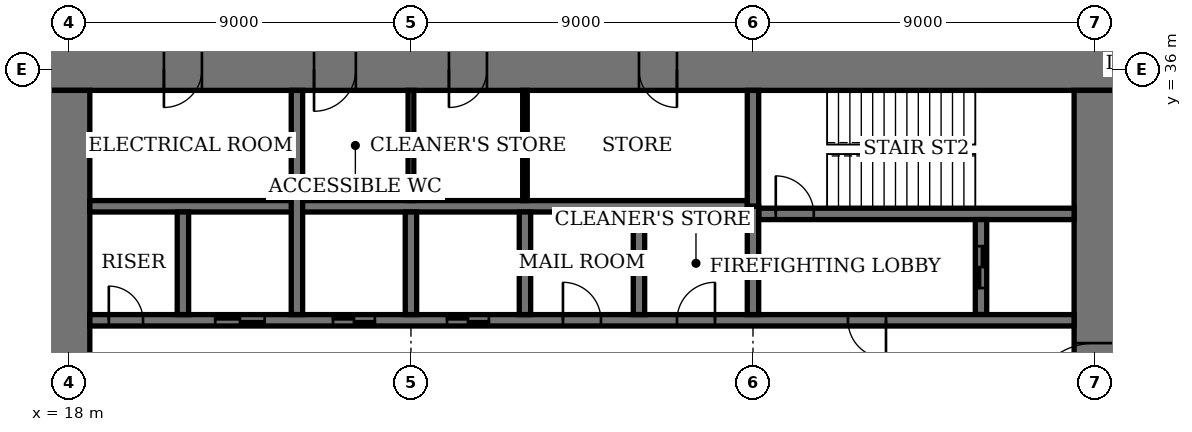
"""IFC4 building model, lengths in metres.
Left out: names, types, materials, properties, quantities, classifications, styles, units other than length and angle.
Written with IfcOpenShell. Run it as: python <this file> out.ifc"""

import sys

from ifc_helpers import new_model, si_unit, direction, frame, frame_2d, origin, place, context, subcontext, project, spatial, rectangle, extrude, element, fill, save


model = new_model("IFC4")
c1 = context("Model", 3, precision=1e-05, world=origin(), true_north=direction((0.0, 1.0)))
c2 = subcontext(c1, "Body", "Model", "MODEL_VIEW")
j1 = project(units=[si_unit("LENGTHUNIT", "METRE"), si_unit("PLANEANGLEUNIT", "RADIAN")], contexts=[c1])
p1 = place(None, origin())
s1 = spatial("IfcSite", under=j1, at=p1, CompositionType="ELEMENT")
p2 = place(p1, origin())
s2 = spatial("IfcBuilding", under=s1, at=p2, CompositionType="ELEMENT")
p3 = place(p2, frame((0.0, 0.0, 194.2)))
s3 = spatial("IfcBuildingStorey", under=s2, at=p3, CompositionType="ELEMENT", Elevation=194.2)
p4 = place(p3, frame((45.55, 36.0, 0.0), z_axis=(0.0, 0.0, 1.0), x_axis=(-1.0, 0.0, 0.0)))
e1 = element("IfcWall", 1, at=p4, inside=s3, PredefinedType="SHEAR", context=c2, shape_type="SweptSolid", body=[
    extrude(rectangle(XDim=28.1, YDim=1.1, at=frame_2d((14.05, 0.0))), origin(), (0.0, 0.0, 1.0), 4.0),
])
p5 = place(p4, frame((11.55, 0.0, 0.0)))
e2 = element("IfcOpeningElement", 2, at=p5, cuts=e1, PredefinedType="OPENING", context=c2, shape_type="SweptSolid", body=[
    extrude(rectangle(XDim=1.0, YDim=2.4, at=frame_2d((0.5, 1.2))), frame((0.0, 0.56, 0.0), z_axis=(0.0, -1.0, 0.0), x_axis=(1.0, 0.0, 0.0)), (0.0, 0.0, 1.0), 1.12),
])
p6 = place(p4, frame((16.55, 0.0, 0.0)))
e3 = element("IfcOpeningElement", 3, at=p6, cuts=e1, PredefinedType="OPENING", context=c2, shape_type="SweptSolid", body=[
    extrude(rectangle(XDim=1.0, YDim=2.4, at=frame_2d((0.5, 1.2))), frame((0.0, 0.56, 0.0), z_axis=(0.0, -1.0, 0.0), x_axis=(1.0, 0.0, 0.0)), (0.0, 0.0, 1.0), 1.12),
])
p7 = place(p4, frame((20.0, 0.0, 0.0)))
e4 = element("IfcOpeningElement", 4, at=p7, cuts=e1, PredefinedType="OPENING", context=c2, shape_type="SweptSolid", body=[
    extrude(rectangle(XDim=1.1, YDim=2.4, at=frame_2d((0.55, 1.2))), frame((0.0, 0.56, 0.0), z_axis=(0.0, -1.0, 0.0), x_axis=(1.0, 0.0, 0.0)), (0.0, 0.0, 1.0), 1.12),
])
p8 = place(p4, frame((24.05, 0.0, 0.0)))
e5 = element("IfcOpeningElement", 5, at=p8, cuts=e1, PredefinedType="OPENING", context=c2, shape_type="SweptSolid", body=[
    extrude(rectangle(XDim=1.0, YDim=2.4, at=frame_2d((0.5, 1.2))), frame((0.0, 0.56, 0.0), z_axis=(0.0, -1.0, 0.0), x_axis=(1.0, 0.0, 0.0)), (0.0, 0.0, 1.0), 1.12),
])
p9 = place(p3, frame((18.0, 35.45, 0.0), z_axis=(0.0, 0.0, 1.0), x_axis=(0.0, -1.0, 0.0)))
e6 = element("IfcWall", 6, at=p9, inside=s3, PredefinedType="SHEAR", context=c2, shape_type="SweptSolid", body=[
    extrude(rectangle(XDim=16.9, YDim=1.1, at=frame_2d((8.45, 0.0))), origin(), (0.0, 0.0, 1.0), 4.0),
])
p10 = place(p9, frame((8.45, 0.0, 0.0)))
e7 = element("IfcOpeningElement", 7, at=p10, cuts=e6, PredefinedType="OPENING", context=c2, shape_type="SweptSolid", body=[
    extrude(rectangle(XDim=1.8, YDim=2.4, at=frame_2d((0.9, 1.2))), frame((0.0, 0.56, 0.0), z_axis=(0.0, -1.0, 0.0), x_axis=(1.0, 0.0, 0.0)), (0.0, 0.0, 1.0), 1.12),
])
p11 = place(p3, frame((45.0, 18.55, 0.0), z_axis=(0.0, 0.0, 1.0), x_axis=(0.0, 1.0, 0.0)))
e8 = element("IfcWall", 8, at=p11, inside=s3, PredefinedType="SHEAR", context=c2, shape_type="SweptSolid", body=[
    extrude(rectangle(XDim=16.9, YDim=1.1, at=frame_2d((8.45, 0.0))), origin(), (0.0, 0.0, 1.0), 4.0),
])
p12 = place(p11, frame((8.45, 0.0, 0.0)))
e9 = element("IfcOpeningElement", 9, at=p12, cuts=e8, PredefinedType="OPENING", context=c2, shape_type="SweptSolid", body=[
    extrude(rectangle(XDim=1.8, YDim=2.4, at=frame_2d((0.9, 1.2))), frame((0.0, 0.56, 0.0), z_axis=(0.0, -1.0, 0.0), x_axis=(1.0, 0.0, 0.0)), (0.0, 0.0, 1.0), 1.12),
])
p13 = place(p3, frame((36.15, 32.2, 0.0), z_axis=(0.0, 0.0, 1.0), x_axis=(1.0, 0.0, 0.0)))
e10 = element("IfcWall", 10, at=p13, inside=s3, PredefinedType="SHEAR", context=c2, shape_type="SweptSolid", body=[
    extrude(rectangle(XDim=8.3, YDim=0.3, at=frame_2d((4.15, 0.0))), origin(), (0.0, 0.0, 1.0), 4.0),
])
p14 = place(p13, frame((0.45, 0.0, 0.0)))
e11 = element("IfcOpeningElement", 11, at=p14, cuts=e10, PredefinedType="OPENING", context=c2, shape_type="SweptSolid", body=[
    extrude(rectangle(XDim=1.0, YDim=2.4, at=frame_2d((0.5, 1.2))), frame((0.0, 0.16, 0.0), z_axis=(0.0, -1.0, 0.0), x_axis=(1.0, 0.0, 0.0)), (0.0, 0.0, 1.0), 0.32),
])
p15 = place(p3, frame((36.0, 32.4, 0.0), z_axis=(0.0, 0.0, 1.0), x_axis=(0.0, 1.0, 0.0)))
e12 = element("IfcWall", 12, at=p15, inside=s3, PredefinedType="SHEAR", context=c2, shape_type="SweptSolid", body=[
    extrude(rectangle(XDim=3.05, YDim=0.3, at=frame_2d((1.525, 0.0))), origin(), (0.0, 0.0, 1.0), 4.0),
])
p16 = place(p3, frame((42.0, 29.55, 0.0), z_axis=(0.0, 0.0, 1.0), x_axis=(0.0, 1.0, 0.0)))
e13 = element("IfcWall", 13, at=p16, inside=s3, PredefinedType="SHEAR", context=c2, shape_type="SweptSolid", body=[
    extrude(rectangle(XDim=2.5, YDim=0.3, at=frame_2d((1.25, 0.0))), origin(), (0.0, 0.0, 1.0), 4.0),
])
p17 = place(p16, frame((0.7, 0.0, 0.0)))
e14 = element("IfcOpeningElement", 14, at=p17, cuts=e13, PredefinedType="OPENING", context=c2, shape_type="SweptSolid", body=[
    extrude(rectangle(XDim=1.1, YDim=2.4, at=frame_2d((0.55, 1.2))), frame((0.0, 0.16, 0.0), z_axis=(0.0, -1.0, 0.0), x_axis=(1.0, 0.0, 0.0)), (0.0, 0.0, 1.0), 0.32),
])
p18 = place(p3, frame((18.55, 29.4, 0.0), z_axis=(0.0, 0.0, 1.0), x_axis=(1.0, 0.0, 0.0)))
e15 = element("IfcWall", 15, at=p18, inside=s3, PredefinedType="SHEAR", context=c2, shape_type="SweptSolid", body=[
    extrude(rectangle(XDim=25.9, YDim=0.3, at=frame_2d((12.95, 0.0))), origin(), (0.0, 0.0, 1.0), 4.0),
])
p19 = place(p18, frame((19.95, 0.0, 0.0)))
e16 = element("IfcOpeningElement", 16, at=p19, cuts=e15, PredefinedType="OPENING", context=c2, shape_type="SweptSolid", body=[
    extrude(rectangle(XDim=1.0, YDim=2.4, at=frame_2d((0.5, 1.2))), frame((0.0, 0.16, 0.0), z_axis=(0.0, -1.0, 0.0), x_axis=(1.0, 0.0, 0.0)), (0.0, 0.0, 1.0), 0.32),
])
p20 = place(p18, frame((0.5, 0.0, 0.0)))
e17 = element("IfcOpeningElement", 17, at=p20, cuts=e15, PredefinedType="OPENING", context=c2, shape_type="SweptSolid", body=[
    extrude(rectangle(XDim=0.9, YDim=2.1, at=frame_2d((0.45, 1.05))), frame((0.0, 0.16, 0.0), z_axis=(0.0, -1.0, 0.0), x_axis=(1.0, 0.0, 0.0)), (0.0, 0.0, 1.0), 0.32),
])
p21 = place(p18, frame((15.45, 0.0, 0.0)))
e18 = element("IfcOpeningElement", 18, at=p21, cuts=e15, PredefinedType="OPENING", context=c2, shape_type="SweptSolid", body=[
    extrude(rectangle(XDim=1.0, YDim=2.4, at=frame_2d((0.5, 1.2))), frame((0.0, 0.16, 0.0), z_axis=(0.0, -1.0, 0.0), x_axis=(1.0, 0.0, 0.0)), (0.0, 0.0, 1.0), 0.32),
])
p22 = place(p18, frame((12.45, 0.0, 0.0)))
e19 = element("IfcOpeningElement", 19, at=p22, cuts=e15, PredefinedType="OPENING", context=c2, shape_type="SweptSolid", body=[
    extrude(rectangle(XDim=1.0, YDim=2.4, at=frame_2d((0.5, 1.2))), frame((0.0, 0.16, 0.0), z_axis=(0.0, -1.0, 0.0), x_axis=(1.0, 0.0, 0.0)), (0.0, 0.0, 1.0), 0.32),
])
p23 = place(p18, frame((9.4, 0.0, 0.0)))
e20 = element("IfcOpeningElement", 20, at=p23, cuts=e15, PredefinedType="OPENING", context=c2, shape_type="SweptSolid", body=[
    extrude(rectangle(XDim=1.1, YDim=2.4, at=frame_2d((0.55, 1.2))), frame((0.0, 0.16, 0.0), z_axis=(0.0, -1.0, 0.0), x_axis=(1.0, 0.0, 0.0)), (0.0, 0.0, 1.0), 0.32),
])
p24 = place(p18, frame((6.4, 0.0, 0.0)))
e21 = element("IfcOpeningElement", 21, at=p24, cuts=e15, PredefinedType="OPENING", context=c2, shape_type="SweptSolid", body=[
    extrude(rectangle(XDim=1.1, YDim=2.4, at=frame_2d((0.55, 1.2))), frame((0.0, 0.16, 0.0), z_axis=(0.0, -1.0, 0.0), x_axis=(1.0, 0.0, 0.0)), (0.0, 0.0, 1.0), 0.32),
])
p25 = place(p18, frame((3.3, 0.0, 0.0)))
e22 = element("IfcOpeningElement", 22, at=p25, cuts=e15, PredefinedType="OPENING", context=c2, shape_type="SweptSolid", body=[
    extrude(rectangle(XDim=1.3, YDim=2.4, at=frame_2d((0.65, 1.2))), frame((0.0, 0.16, 0.0), z_axis=(0.0, -1.0, 0.0), x_axis=(1.0, 0.0, 0.0)), (0.0, 0.0, 1.0), 0.32),
])
p26 = place(p3, frame((18.55, 32.4, 0.0), z_axis=(0.0, 0.0, 1.0), x_axis=(1.0, 0.0, 0.0)))
e23 = element("IfcWall", 23, at=p26, inside=s3, PredefinedType="SHEAR", context=c2, shape_type="SweptSolid", body=[
    extrude(rectangle(XDim=17.3, YDim=0.3, at=frame_2d((8.65, 0.0))), origin(), (0.0, 0.0, 1.0), 4.0),
])
for number, where, z_axis, x_axis in (
    (24, (33.0, 29.55, 0.0), (0.0, 0.0, 1.0), (0.0, 1.0, 0.0)),
    (25, (30.0, 29.55, 0.0), (0.0, 0.0, 1.0), (0.0, 1.0, 0.0)),
    (26, (27.0, 29.55, 0.0), (0.0, 0.0, 1.0), (0.0, 1.0, 0.0)),
):
    element("IfcWall", number, at=place(p3, frame(where, z_axis=z_axis, x_axis=x_axis)), inside=s3, PredefinedType="SHEAR", context=c2, shape_type="SweptSolid", body=[
        extrude(rectangle(XDim=2.7, YDim=0.3, at=frame_2d((1.35, 0.0))), origin(), (0.0, 0.0, 1.0), 4.0),
    ])
p27 = place(p3, frame((24.0, 29.55, 0.0), z_axis=(0.0, 0.0, 1.0), x_axis=(0.0, 1.0, 0.0)))
e27 = element("IfcWall", 27, at=p27, inside=s3, PredefinedType="SHEAR", context=c2, shape_type="SweptSolid", body=[
    extrude(rectangle(XDim=5.9, YDim=0.3, at=frame_2d((2.95, 0.0))), origin(), (0.0, 0.0, 1.0), 4.0),
])
p28 = place(p3, frame((21.0, 29.55, 0.0), z_axis=(0.0, 0.0, 1.0), x_axis=(0.0, 1.0, 0.0)))
e28 = element("IfcWall", 28, at=p28, inside=s3, PredefinedType="SHEAR", context=c2, shape_type="SweptSolid", body=[
    extrude(rectangle(XDim=2.7, YDim=0.3, at=frame_2d((1.35, 0.0))), origin(), (0.0, 0.0, 1.0), 4.0),
])
p29 = place(p3, frame((36.0, 29.55, 0.0), z_axis=(0.0, 0.0, 1.0), x_axis=(0.0, 1.0, 0.0)))
e29 = element("IfcWall", 29, at=p29, inside=s3, PredefinedType="SHEAR", context=c2, shape_type="SweptSolid", body=[
    extrude(rectangle(XDim=2.85, YDim=0.3, at=frame_2d((1.425, 0.0))), origin(), (0.0, 0.0, 1.0), 4.0),
])
p30 = place(p3, frame((30.0, 32.55, 0.0), z_axis=(0.0, 0.0, 1.0), x_axis=(0.0, 1.0, 0.0)))
e30 = element("IfcWall", 30, at=p30, inside=s3, PredefinedType="PARTITIONING", context=c2, shape_type="SweptSolid", body=[
    extrude(rectangle(XDim=2.9, YDim=0.12, at=frame_2d((1.45, 0.0))), origin(), (0.0, 0.0, 1.0), 3.75),
])
p31 = place(p3, frame((27.0, 32.55, 0.0), z_axis=(0.0, 0.0, 1.0), x_axis=(0.0, 1.0, 0.0)))
e31 = element("IfcWall", 31, at=p31, inside=s3, PredefinedType="PARTITIONING", context=c2, shape_type="SweptSolid", body=[
    extrude(rectangle(XDim=2.9, YDim=0.15, at=frame_2d((1.45, 0.0))), origin(), (0.0, 0.0, 1.0), 3.75),
])
p32 = place(p12, origin())
e32 = element("IfcDoor", 32, at=p32, inside=s3, OperationType="DOUBLE_DOOR_DOUBLE_SWING", PredefinedType="DOOR", context=c2, shape_type="SweptSolid", body=[
    extrude(rectangle(XDim=1.8, YDim=2.4, at=frame_2d((0.9, 1.2))), frame((0.0, 0.03, 0.0), z_axis=(0.0, -1.0, 0.0), x_axis=(1.0, 0.0, 0.0)), (0.0, 0.0, 1.0), 0.06),
    extrude(rectangle(XDim=0.04, YDim=2.4, at=frame_2d((0.02, 1.2))), frame((0.0, 0.55, 0.0), z_axis=(0.0, -1.0, 0.0), x_axis=(1.0, 0.0, 0.0)), (0.0, 0.0, 1.0), 1.1),
    extrude(rectangle(XDim=0.04, YDim=2.4, at=frame_2d((1.78, 1.2))), frame((0.0, 0.55, 0.0), z_axis=(0.0, -1.0, 0.0), x_axis=(1.0, 0.0, 0.0)), (0.0, 0.0, 1.0), 1.1),
    extrude(rectangle(XDim=1.8, YDim=0.04, at=frame_2d((0.9, 2.38))), frame((0.0, 0.55, 0.0), z_axis=(0.0, -1.0, 0.0), x_axis=(1.0, 0.0, 0.0)), (0.0, 0.0, 1.0), 1.1),
])
fill(e9, e32)
p33 = place(p5, origin())
e33 = element("IfcDoor", 33, at=p33, inside=s3, OperationType="SINGLE_SWING_RIGHT", PredefinedType="DOOR", context=c2, shape_type="SweptSolid", body=[
    extrude(rectangle(XDim=1.0, YDim=2.4, at=frame_2d((0.5, 1.2))), frame((0.0, 0.025, 0.0), z_axis=(0.0, -1.0, 0.0), x_axis=(1.0, 0.0, 0.0)), (0.0, 0.0, 1.0), 0.05),
    extrude(rectangle(XDim=0.04, YDim=2.4, at=frame_2d((0.02, 1.2))), frame((0.0, 0.4, 0.0), z_axis=(0.0, -1.0, 0.0), x_axis=(1.0, 0.0, 0.0)), (0.0, 0.0, 1.0), 0.8),
    extrude(rectangle(XDim=0.04, YDim=2.4, at=frame_2d((0.98, 1.2))), frame((0.0, 0.4, 0.0), z_axis=(0.0, -1.0, 0.0), x_axis=(1.0, 0.0, 0.0)), (0.0, 0.0, 1.0), 0.8),
    extrude(rectangle(XDim=1.0, YDim=0.04, at=frame_2d((0.5, 2.38))), frame((0.0, 0.4, 0.0), z_axis=(0.0, -1.0, 0.0), x_axis=(1.0, 0.0, 0.0)), (0.0, 0.0, 1.0), 0.8),
])
fill(e2, e33)
p34 = place(p6, origin())
e34 = element("IfcDoor", 34, at=p34, inside=s3, OperationType="SINGLE_SWING_LEFT", PredefinedType="DOOR", context=c2, shape_type="SweptSolid", body=[
    extrude(rectangle(XDim=1.0, YDim=2.4, at=frame_2d((0.5, 1.2))), frame((0.0, 0.025, 0.0), z_axis=(0.0, -1.0, 0.0), x_axis=(1.0, 0.0, 0.0)), (0.0, 0.0, 1.0), 0.05),
    extrude(rectangle(XDim=0.04, YDim=2.4, at=frame_2d((0.02, 1.2))), frame((0.0, 0.4, 0.0), z_axis=(0.0, -1.0, 0.0), x_axis=(1.0, 0.0, 0.0)), (0.0, 0.0, 1.0), 0.8),
    extrude(rectangle(XDim=0.04, YDim=2.4, at=frame_2d((0.98, 1.2))), frame((0.0, 0.4, 0.0), z_axis=(0.0, -1.0, 0.0), x_axis=(1.0, 0.0, 0.0)), (0.0, 0.0, 1.0), 0.8),
    extrude(rectangle(XDim=1.0, YDim=0.04, at=frame_2d((0.5, 2.38))), frame((0.0, 0.4, 0.0), z_axis=(0.0, -1.0, 0.0), x_axis=(1.0, 0.0, 0.0)), (0.0, 0.0, 1.0), 0.8),
])
fill(e3, e34)
p35 = place(p7, origin())
e35 = element("IfcDoor", 35, at=p35, inside=s3, OperationType="SINGLE_SWING_LEFT", PredefinedType="DOOR", context=c2, shape_type="SweptSolid", body=[
    extrude(rectangle(XDim=1.1, YDim=2.4, at=frame_2d((0.55, 1.2))), frame((0.0, 0.025, 0.0), z_axis=(0.0, -1.0, 0.0), x_axis=(1.0, 0.0, 0.0)), (0.0, 0.0, 1.0), 0.05),
    extrude(rectangle(XDim=0.04, YDim=2.4, at=frame_2d((0.02, 1.2))), frame((0.0, 0.44, 0.0), z_axis=(0.0, -1.0, 0.0), x_axis=(1.0, 0.0, 0.0)), (0.0, 0.0, 1.0), 0.88),
    extrude(rectangle(XDim=0.04, YDim=2.4, at=frame_2d((1.08, 1.2))), frame((0.0, 0.44, 0.0), z_axis=(0.0, -1.0, 0.0), x_axis=(1.0, 0.0, 0.0)), (0.0, 0.0, 1.0), 0.88),
    extrude(rectangle(XDim=1.1, YDim=0.04, at=frame_2d((0.55, 2.38))), frame((0.0, 0.44, 0.0), z_axis=(0.0, -1.0, 0.0), x_axis=(1.0, 0.0, 0.0)), (0.0, 0.0, 1.0), 0.88),
])
fill(e4, e35)
p36 = place(p8, origin())
e36 = element("IfcDoor", 36, at=p36, inside=s3, OperationType="SINGLE_SWING_LEFT", PredefinedType="DOOR", context=c2, shape_type="SweptSolid", body=[
    extrude(rectangle(XDim=1.0, YDim=2.4, at=frame_2d((0.5, 1.2))), frame((0.0, 0.025, 0.0), z_axis=(0.0, -1.0, 0.0), x_axis=(1.0, 0.0, 0.0)), (0.0, 0.0, 1.0), 0.05),
    extrude(rectangle(XDim=0.04, YDim=2.4, at=frame_2d((0.02, 1.2))), frame((0.0, 0.4, 0.0), z_axis=(0.0, -1.0, 0.0), x_axis=(1.0, 0.0, 0.0)), (0.0, 0.0, 1.0), 0.8),
    extrude(rectangle(XDim=0.04, YDim=2.4, at=frame_2d((0.98, 1.2))), frame((0.0, 0.4, 0.0), z_axis=(0.0, -1.0, 0.0), x_axis=(1.0, 0.0, 0.0)), (0.0, 0.0, 1.0), 0.8),
    extrude(rectangle(XDim=1.0, YDim=0.04, at=frame_2d((0.5, 2.38))), frame((0.0, 0.4, 0.0), z_axis=(0.0, -1.0, 0.0), x_axis=(1.0, 0.0, 0.0)), (0.0, 0.0, 1.0), 0.8),
])
fill(e5, e36)
p37 = place(p14, origin())
e37 = element("IfcDoor", 37, at=p37, inside=s3, OperationType="SINGLE_SWING_RIGHT", PredefinedType="DOOR", context=c2, shape_type="SweptSolid", body=[
    extrude(rectangle(XDim=1.0, YDim=2.4, at=frame_2d((0.5, 1.2))), frame((0.0, 0.03, 0.0), z_axis=(0.0, -1.0, 0.0), x_axis=(1.0, 0.0, 0.0)), (0.0, 0.0, 1.0), 0.06),
])
fill(e11, e37)
p38 = place(p19, origin())
e38 = element("IfcDoor", 38, at=p38, inside=s3, OperationType="SINGLE_SWING_RIGHT", PredefinedType="DOOR", context=c2, shape_type="SweptSolid", body=[
    extrude(rectangle(XDim=1.0, YDim=2.4, at=frame_2d((0.5, 1.2))), frame((0.0, 0.03, 0.0), z_axis=(0.0, -1.0, 0.0), x_axis=(1.0, 0.0, 0.0)), (0.0, 0.0, 1.0), 0.06),
])
fill(e16, e38)
p39 = place(p20, origin())
e39 = element("IfcDoor", 39, at=p39, inside=s3, OperationType="SINGLE_SWING_RIGHT", PredefinedType="DOOR", context=c2, shape_type="SweptSolid", body=[
    extrude(rectangle(XDim=0.9, YDim=2.1, at=frame_2d((0.45, 1.05))), frame((0.0, 0.03, 0.0), z_axis=(0.0, -1.0, 0.0), x_axis=(1.0, 0.0, 0.0)), (0.0, 0.0, 1.0), 0.06),
])
fill(e17, e39)
p40 = place(p21, origin())
e40 = element("IfcDoor", 40, at=p40, inside=s3, OperationType="SINGLE_SWING_LEFT", PredefinedType="DOOR", context=c2, shape_type="SweptSolid", body=[
    extrude(rectangle(XDim=1.0, YDim=2.4, at=frame_2d((0.5, 1.2))), frame((0.0, 0.03, 0.0), z_axis=(0.0, -1.0, 0.0), x_axis=(1.0, 0.0, 0.0)), (0.0, 0.0, 1.0), 0.06),
])
fill(e18, e40)
p41 = place(p22, origin())
e41 = element("IfcDoor", 41, at=p41, inside=s3, OperationType="SINGLE_SWING_RIGHT", PredefinedType="DOOR", context=c2, shape_type="SweptSolid", body=[
    extrude(rectangle(XDim=1.0, YDim=2.4, at=frame_2d((0.5, 1.2))), frame((0.0, 0.03, 0.0), z_axis=(0.0, -1.0, 0.0), x_axis=(1.0, 0.0, 0.0)), (0.0, 0.0, 1.0), 0.06),
])
fill(e19, e41)
p42 = place(p23, origin())
e42 = element("IfcDoor", 42, at=p42, inside=s3, OperationType="DOUBLE_DOOR_SLIDING", PredefinedType="DOOR", context=c2, shape_type="SweptSolid", body=[
    extrude(rectangle(XDim=1.1, YDim=2.4, at=frame_2d((0.55, 1.2))), frame((0.0, 0.02, 0.0), z_axis=(0.0, -1.0, 0.0), x_axis=(1.0, 0.0, 0.0)), (0.0, 0.0, 1.0), 0.04),
])
fill(e20, e42)
p43 = place(p24, origin())
e43 = element("IfcDoor", 43, at=p43, inside=s3, OperationType="DOUBLE_DOOR_SLIDING", PredefinedType="DOOR", context=c2, shape_type="SweptSolid", body=[
    extrude(rectangle(XDim=1.1, YDim=2.4, at=frame_2d((0.55, 1.2))), frame((0.0, 0.02, 0.0), z_axis=(0.0, -1.0, 0.0), x_axis=(1.0, 0.0, 0.0)), (0.0, 0.0, 1.0), 0.04),
])
fill(e21, e43)
p44 = place(p25, origin())
e44 = element("IfcDoor", 44, at=p44, inside=s3, OperationType="DOUBLE_DOOR_SLIDING", PredefinedType="DOOR", context=c2, shape_type="SweptSolid", body=[
    extrude(rectangle(XDim=1.3, YDim=2.4, at=frame_2d((0.65, 1.2))), frame((0.0, 0.02, 0.0), z_axis=(0.0, -1.0, 0.0), x_axis=(1.0, 0.0, 0.0)), (0.0, 0.0, 1.0), 0.04),
])
fill(e22, e44)
p45 = place(p17, origin())
e45 = element("IfcDoor", 45, at=p45, inside=s3, OperationType="DOUBLE_DOOR_SLIDING", PredefinedType="DOOR", context=c2, shape_type="SweptSolid", body=[
    extrude(rectangle(XDim=1.1, YDim=2.4, at=frame_2d((0.55, 1.2))), frame((0.0, 0.03, 0.0), z_axis=(0.0, -1.0, 0.0), x_axis=(1.0, 0.0, 0.0)), (0.0, 0.0, 1.0), 0.06),
])
fill(e14, e45)
save(model, sys.argv[1])
